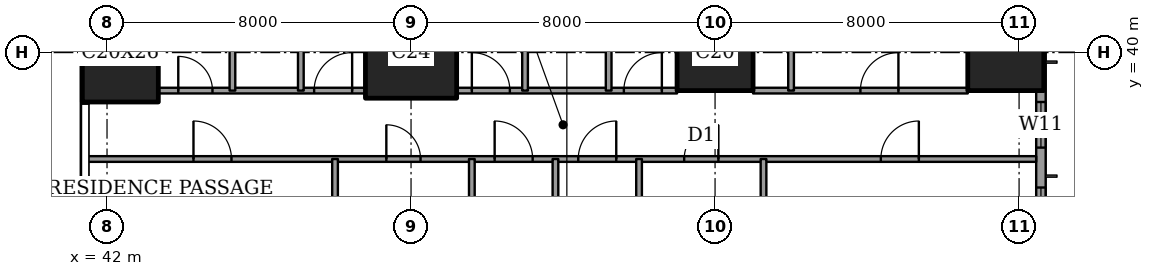
"""IFC4 building model, lengths in metres.
Left out: names, types, materials, properties, quantities, classifications, styles, units other than length and angle.
Written with IfcOpenShell. Run it as: python <this file> out.ifc"""

import sys

from ifc_helpers import new_model, si_unit, direction, frame, frame_2d, origin, origin_2d, place, context, subcontext, project, spatial, rectangle, extrude, element, fill, save


model = new_model("IFC4")
c1 = context("Model", 3, precision=1e-05, world=origin(), true_north=direction((0.0, 1.0)))
c2 = subcontext(c1, "Body", "Model", "MODEL_VIEW")
j1 = project(units=[si_unit("LENGTHUNIT", "METRE"), si_unit("PLANEANGLEUNIT", "RADIAN")], contexts=[c1])
p1 = place(None, origin())
s1 = spatial("IfcSite", under=j1, at=p1, CompositionType="ELEMENT")
p2 = place(p1, origin())
s2 = spatial("IfcBuilding", under=s1, at=p2, CompositionType="ELEMENT")
p3 = place(p2, frame((0.0, 0.0, 143.0)))
s3 = spatial("IfcBuildingStorey", under=s2, at=p3, CompositionType="ELEMENT", Elevation=143.0)
p4 = place(p3, frame((42.35, 40.0, 0.0), z_axis=(0.0, 0.0, 1.0), x_axis=(1.0, 0.0, 0.0)))
e1 = element("IfcColumn", 1, at=p4, inside=s3, PredefinedType="COLUMN", context=c2, shape_type="SweptSolid", body=[
    extrude(rectangle(XDim=2.0, YDim=2.6, at=origin_2d()), origin(), (0.0, 0.0, 1.0), 3.6),
])
p5 = place(p3, frame((50.0, 40.0, 0.0), z_axis=(0.0, 0.0, 1.0), x_axis=(1.0, 0.0, 0.0)))
e2 = element("IfcColumn", 2, at=p5, inside=s3, PredefinedType="COLUMN", context=c2, shape_type="SweptSolid", body=[
    extrude(rectangle(XDim=2.4, YDim=2.4, at=origin_2d()), origin(), (0.0, 0.0, 1.0), 3.6),
])
for number, where, z_axis, x_axis in (
    (3, (58.0, 40.0, 0.0), (0.0, 0.0, 1.0), (1.0, 0.0, 0.0)),
    (4, (65.65, 40.0, 0.0), (0.0, 0.0, 1.0), (1.0, 0.0, 0.0)),
):
    element("IfcColumn", number, at=place(p3, frame(where, z_axis=z_axis, x_axis=x_axis)), inside=s3, PredefinedType="COLUMN", context=c2, shape_type="SweptSolid", body=[
        extrude(rectangle(XDim=2.0, YDim=2.0, at=origin_2d()), origin(), (0.0, 0.0, 1.0), 3.6),
    ])
p6 = place(p3, frame((66.575, 3.175, 0.0), z_axis=(0.0, 0.0, 1.0), x_axis=(0.0, 1.0, 0.0)))
e5 = element("IfcWall", 5, at=p6, inside=s3, PredefinedType="SOLIDWALL", context=c2, shape_type="SweptSolid", body=[
    extrude(rectangle(XDim=41.65, YDim=0.25, at=frame_2d((20.825, 0.0))), origin(), (0.0, 0.0, 1.0), 3.6),
])
p7 = place(p6, frame((0.775, 0.0, 0.4)))
e6 = element("IfcOpeningElement", 6, at=p7, cuts=e5, PredefinedType="OPENING", context=c2, shape_type="SweptSolid", body=[
    extrude(rectangle(XDim=2.4, YDim=2.2, at=frame_2d((1.2, 1.1))), frame((0.0, 0.135, 0.0), z_axis=(0.0, -1.0, 0.0), x_axis=(1.0, 0.0, 0.0)), (0.0, 0.0, 1.0), 0.27),
])
p8 = place(p6, frame((6.1, 0.0, 0.4)))
e7 = element("IfcOpeningElement", 7, at=p8, cuts=e5, PredefinedType="OPENING", context=c2, shape_type="SweptSolid", body=[
    extrude(rectangle(XDim=1.2, YDim=2.2, at=frame_2d((0.6, 1.1))), frame((0.0, 0.135, 0.0), z_axis=(0.0, -1.0, 0.0), x_axis=(1.0, 0.0, 0.0)), (0.0, 0.0, 1.0), 0.27),
])
p9 = place(p6, frame((8.275, 0.0, 0.4)))
e8 = element("IfcOpeningElement", 8, at=p9, cuts=e5, PredefinedType="OPENING", context=c2, shape_type="SweptSolid", body=[
    extrude(rectangle(XDim=2.4, YDim=2.2, at=frame_2d((1.2, 1.1))), frame((0.0, 0.135, 0.0), z_axis=(0.0, -1.0, 0.0), x_axis=(1.0, 0.0, 0.0)), (0.0, 0.0, 1.0), 0.27),
])
p10 = place(p6, frame((15.775, 0.0, 0.4)))
e9 = element("IfcOpeningElement", 9, at=p10, cuts=e5, PredefinedType="OPENING", context=c2, shape_type="SweptSolid", body=[
    extrude(rectangle(XDim=2.4, YDim=2.2, at=frame_2d((1.2, 1.1))), frame((0.0, 0.135, 0.0), z_axis=(0.0, -1.0, 0.0), x_axis=(1.0, 0.0, 0.0)), (0.0, 0.0, 1.0), 0.27),
])
p11 = place(p6, frame((23.475, 0.0, 0.4)))
e10 = element("IfcOpeningElement", 10, at=p11, cuts=e5, PredefinedType="OPENING", context=c2, shape_type="SweptSolid", body=[
    extrude(rectangle(XDim=2.4, YDim=2.2, at=frame_2d((1.2, 1.1))), frame((0.0, 0.135, 0.0), z_axis=(0.0, -1.0, 0.0), x_axis=(1.0, 0.0, 0.0)), (0.0, 0.0, 1.0), 0.27),
])
p12 = place(p6, frame((30.875, 0.0, 0.4)))
e11 = element("IfcOpeningElement", 11, at=p12, cuts=e5, PredefinedType="OPENING", context=c2, shape_type="SweptSolid", body=[
    extrude(rectangle(XDim=2.4, YDim=2.2, at=frame_2d((1.2, 1.1))), frame((0.0, 0.135, 0.0), z_axis=(0.0, -1.0, 0.0), x_axis=(1.0, 0.0, 0.0)), (0.0, 0.0, 1.0), 0.27),
])
p13 = place(p6, frame((34.325, 0.0, 0.4)))
e12 = element("IfcOpeningElement", 12, at=p13, cuts=e5, PredefinedType="OPENING", context=c2, shape_type="SweptSolid", body=[
    extrude(rectangle(XDim=1.2, YDim=2.2, at=frame_2d((0.6, 1.1))), frame((0.0, 0.135, 0.0), z_axis=(0.0, -1.0, 0.0), x_axis=(1.0, 0.0, 0.0)), (0.0, 0.0, 1.0), 0.27),
])
p14 = place(p6, frame((38.475, 0.0, 0.4)))
e13 = element("IfcOpeningElement", 13, at=p14, cuts=e5, PredefinedType="OPENING", context=c2, shape_type="SweptSolid", body=[
    extrude(rectangle(XDim=2.4, YDim=2.2, at=frame_2d((1.2, 1.1))), frame((0.0, 0.135, 0.0), z_axis=(0.0, -1.0, 0.0), x_axis=(1.0, 0.0, 0.0)), (0.0, 0.0, 1.0), 0.27),
])
p15 = place(p3, frame((41.439, 37.2, 0.0), z_axis=(0.0, 0.0, 1.0), x_axis=(1.0, 0.0, 0.0)))
e14 = element("IfcWall", 14, at=p15, inside=s3, PredefinedType="PARTITIONING", context=c2, shape_type="SweptSolid", body=[
    extrude(rectangle(XDim=25.011, YDim=0.15, at=frame_2d((12.505, 0.0))), origin(), (0.0, 0.0, 1.0), 3.35),
])
p16 = place(p15, frame((10.761, 0.0, 0.0)))
e15 = element("IfcOpeningElement", 15, at=p16, cuts=e14, PredefinedType="OPENING", context=c2, shape_type="SweptSolid", body=[
    extrude(rectangle(XDim=1.0, YDim=2.1, at=frame_2d((0.5, 1.05))), frame((0.0, 0.085, 0.0), z_axis=(0.0, -1.0, 0.0), x_axis=(1.0, 0.0, 0.0)), (0.0, 0.0, 1.0), 0.17),
])
p17 = place(p15, frame((20.924, 0.0, 0.0)))
e16 = element("IfcOpeningElement", 16, at=p17, cuts=e14, PredefinedType="OPENING", context=c2, shape_type="SweptSolid", body=[
    extrude(rectangle(XDim=1.0, YDim=2.1, at=frame_2d((0.5, 1.05))), frame((0.0, 0.085, 0.0), z_axis=(0.0, -1.0, 0.0), x_axis=(1.0, 0.0, 0.0)), (0.0, 0.0, 1.0), 0.17),
])
p18 = place(p15, frame((15.749, 0.0, 0.0)))
e17 = element("IfcOpeningElement", 17, at=p18, cuts=e14, PredefinedType="OPENING", context=c2, shape_type="SweptSolid", body=[
    extrude(rectangle(XDim=0.9, YDim=2.1, at=frame_2d((0.45, 1.05))), frame((0.0, 0.085, 0.0), z_axis=(0.0, -1.0, 0.0), x_axis=(1.0, 0.0, 0.0)), (0.0, 0.0, 1.0), 0.17),
])
p19 = place(p15, frame((12.961, 0.0, 0.0)))
e18 = element("IfcOpeningElement", 18, at=p19, cuts=e14, PredefinedType="OPENING", context=c2, shape_type="SweptSolid", body=[
    extrude(rectangle(XDim=1.0, YDim=2.1, at=frame_2d((0.5, 1.05))), frame((0.0, 0.085, 0.0), z_axis=(0.0, -1.0, 0.0), x_axis=(1.0, 0.0, 0.0)), (0.0, 0.0, 1.0), 0.17),
])
p20 = place(p15, frame((7.911, 0.0, 0.0)))
e19 = element("IfcOpeningElement", 19, at=p20, cuts=e14, PredefinedType="OPENING", context=c2, shape_type="SweptSolid", body=[
    extrude(rectangle(XDim=0.9, YDim=2.1, at=frame_2d((0.45, 1.05))), frame((0.0, 0.085, 0.0), z_axis=(0.0, -1.0, 0.0), x_axis=(1.0, 0.0, 0.0)), (0.0, 0.0, 1.0), 0.17),
])
p21 = place(p15, frame((2.836, 0.0, 0.0)))
e20 = element("IfcOpeningElement", 20, at=p21, cuts=e14, PredefinedType="OPENING", context=c2, shape_type="SweptSolid", body=[
    extrude(rectangle(XDim=1.0, YDim=2.1, at=frame_2d((0.5, 1.05))), frame((0.0, 0.085, 0.0), z_axis=(0.0, -1.0, 0.0), x_axis=(1.0, 0.0, 0.0)), (0.0, 0.0, 1.0), 0.17),
])
p22 = place(p3, frame((43.35, 39.0, 0.0), z_axis=(0.0, 0.0, 1.0), x_axis=(1.0, 0.0, 0.0)))
e21 = element("IfcWall", 21, at=p22, inside=s3, PredefinedType="PARTITIONING", context=c2, shape_type="SweptSolid", body=[
    extrude(rectangle(XDim=5.45, YDim=0.15, at=frame_2d((2.725, 0.0))), origin(), (0.0, 0.0, 1.0), 3.35),
])
p23 = place(p22, frame((4.1, 0.0, 0.0)))
e22 = element("IfcOpeningElement", 22, at=p23, cuts=e21, PredefinedType="OPENING", context=c2, shape_type="SweptSolid", body=[
    extrude(rectangle(XDim=1.0, YDim=2.1, at=frame_2d((0.5, 1.05))), frame((0.0, 0.085, 0.0), z_axis=(0.0, -1.0, 0.0), x_axis=(1.0, 0.0, 0.0)), (0.0, 0.0, 1.0), 0.17),
])
p24 = place(p22, frame((0.525, 0.0, 0.0)))
e23 = element("IfcOpeningElement", 23, at=p24, cuts=e21, PredefinedType="OPENING", context=c2, shape_type="SweptSolid", body=[
    extrude(rectangle(XDim=0.9, YDim=2.1, at=frame_2d((0.45, 1.05))), frame((0.0, 0.085, 0.0), z_axis=(0.0, -1.0, 0.0), x_axis=(1.0, 0.0, 0.0)), (0.0, 0.0, 1.0), 0.17),
])
p25 = place(p3, frame((51.2, 39.0, 0.0), z_axis=(0.0, 0.0, 1.0), x_axis=(1.0, 0.0, 0.0)))
e24 = element("IfcWall", 24, at=p25, inside=s3, PredefinedType="PARTITIONING", context=c2, shape_type="SweptSolid", body=[
    extrude(rectangle(XDim=5.8, YDim=0.15, at=frame_2d((2.9, 0.0))), origin(), (0.0, 0.0, 1.0), 3.35),
])
p26 = place(p25, frame((4.4, 0.0, 0.0)))
e25 = element("IfcOpeningElement", 25, at=p26, cuts=e24, PredefinedType="OPENING", context=c2, shape_type="SweptSolid", body=[
    extrude(rectangle(XDim=1.0, YDim=2.1, at=frame_2d((0.5, 1.05))), frame((0.0, 0.085, 0.0), z_axis=(0.0, -1.0, 0.0), x_axis=(1.0, 0.0, 0.0)), (0.0, 0.0, 1.0), 0.17),
])
p27 = place(p25, frame((0.4, 0.0, 0.0)))
e26 = element("IfcOpeningElement", 26, at=p27, cuts=e24, PredefinedType="OPENING", context=c2, shape_type="SweptSolid", body=[
    extrude(rectangle(XDim=1.0, YDim=2.1, at=frame_2d((0.5, 1.05))), frame((0.0, 0.085, 0.0), z_axis=(0.0, -1.0, 0.0), x_axis=(1.0, 0.0, 0.0)), (0.0, 0.0, 1.0), 0.17),
])
p28 = place(p3, frame((59.0, 39.0, 0.0), z_axis=(0.0, 0.0, 1.0), x_axis=(1.0, 0.0, 0.0)))
e27 = element("IfcWall", 27, at=p28, inside=s3, PredefinedType="PARTITIONING", context=c2, shape_type="SweptSolid", body=[
    extrude(rectangle(XDim=5.65, YDim=0.15, at=frame_2d((2.825, 0.0))), origin(), (0.0, 0.0, 1.0), 3.35),
])
p29 = place(p28, frame((2.825, 0.0, 0.0)))
e28 = element("IfcOpeningElement", 28, at=p29, cuts=e27, PredefinedType="OPENING", context=c2, shape_type="SweptSolid", body=[
    extrude(rectangle(XDim=1.0, YDim=2.1, at=frame_2d((0.5, 1.05))), frame((0.0, 0.085, 0.0), z_axis=(0.0, -1.0, 0.0), x_axis=(1.0, 0.0, 0.0)), (0.0, 0.0, 1.0), 0.17),
])
p30 = place(p3, frame((45.3, 39.0, 0.0), z_axis=(0.0, 0.0, 1.0), x_axis=(0.0, 1.0, 0.0)))
e29 = element("IfcWall", 29, at=p30, inside=s3, PredefinedType="PARTITIONING", context=c2, shape_type="SweptSolid", body=[
    extrude(rectangle(XDim=9.45, YDim=0.15, at=frame_2d((4.725, 0.0))), origin(), (0.0, 0.0, 1.0), 3.35),
])
p31 = place(p3, frame((47.1, 39.0, 0.0), z_axis=(0.0, 0.0, 1.0), x_axis=(0.0, 1.0, 0.0)))
e30 = element("IfcWall", 30, at=p31, inside=s3, PredefinedType="PARTITIONING", context=c2, shape_type="SweptSolid", body=[
    extrude(rectangle(XDim=4.7, YDim=0.15, at=frame_2d((2.35, 0.0))), origin(), (0.0, 0.0, 1.0), 3.35),
])
p32 = place(p31, frame((1.9, 0.0, 0.0)))
e31 = element("IfcOpeningElement", 31, at=p32, cuts=e30, PredefinedType="OPENING", context=c2, shape_type="SweptSolid", body=[
    extrude(rectangle(XDim=0.9, YDim=2.1, at=frame_2d((0.45, 1.05))), frame((0.0, 0.085, 0.0), z_axis=(0.0, -1.0, 0.0), x_axis=(1.0, 0.0, 0.0)), (0.0, 0.0, 1.0), 0.17),
])
p33 = place(p3, frame((48.0, 28.0, 0.0), z_axis=(0.0, 0.0, 1.0), x_axis=(0.0, 1.0, 0.0)))
e32 = element("IfcWall", 32, at=p33, inside=s3, PredefinedType="PARTITIONING", context=c2, shape_type="SweptSolid", body=[
    extrude(rectangle(XDim=9.2, YDim=0.15, at=frame_2d((4.6, 0.0))), origin(), (0.0, 0.0, 1.0), 3.35),
])
p34 = place(p33, frame((0.5, 0.0, 0.0)))
e33 = element("IfcOpeningElement", 33, at=p34, cuts=e32, PredefinedType="OPENING", context=c2, shape_type="SweptSolid", body=[
    extrude(rectangle(XDim=1.0, YDim=2.1, at=frame_2d((0.5, 1.05))), frame((0.0, 0.085, 0.0), z_axis=(0.0, -1.0, 0.0), x_axis=(1.0, 0.0, 0.0)), (0.0, 0.0, 1.0), 0.17),
])
p35 = place(p3, frame((51.6, 30.0, 0.0), z_axis=(0.0, 0.0, 1.0), x_axis=(0.0, 1.0, 0.0)))
e34 = element("IfcWall", 34, at=p35, inside=s3, PredefinedType="PARTITIONING", context=c2, shape_type="SweptSolid", body=[
    extrude(rectangle(XDim=7.2, YDim=0.15, at=frame_2d((3.6, 0.0))), origin(), (0.0, 0.0, 1.0), 3.35),
])
p36 = place(p3, frame((53.0, 39.0, 0.0), z_axis=(0.0, 0.0, 1.0), x_axis=(0.0, 1.0, 0.0)))
e35 = element("IfcWall", 35, at=p36, inside=s3, PredefinedType="PARTITIONING", context=c2, shape_type="SweptSolid", body=[
    extrude(rectangle(XDim=9.45, YDim=0.15, at=frame_2d((4.725, 0.0))), origin(), (0.0, 0.0, 1.0), 3.35),
])
p37 = place(p3, frame((53.8, 30.0, 0.0), z_axis=(0.0, 0.0, 1.0), x_axis=(0.0, 1.0, 0.0)))
e36 = element("IfcWall", 36, at=p37, inside=s3, PredefinedType="PARTITIONING", context=c2, shape_type="SweptSolid", body=[
    extrude(rectangle(XDim=7.2, YDim=0.15, at=frame_2d((3.6, 0.0))), origin(), (0.0, 0.0, 1.0), 3.35),
])
p38 = place(p3, frame((55.2, 39.0, 0.0), z_axis=(0.0, 0.0, 1.0), x_axis=(0.0, 1.0, 0.0)))
e37 = element("IfcWall", 37, at=p38, inside=s3, PredefinedType="PARTITIONING", context=c2, shape_type="SweptSolid", body=[
    extrude(rectangle(XDim=3.4, YDim=0.15, at=frame_2d((1.7, 0.0))), origin(), (0.0, 0.0, 1.0), 3.35),
])
p39 = place(p38, frame((1.25, 0.0, 0.0)))
e38 = element("IfcOpeningElement", 38, at=p39, cuts=e37, PredefinedType="OPENING", context=c2, shape_type="SweptSolid", body=[
    extrude(rectangle(XDim=0.9, YDim=2.1, at=frame_2d((0.45, 1.05))), frame((0.0, 0.085, 0.0), z_axis=(0.0, -1.0, 0.0), x_axis=(1.0, 0.0, 0.0)), (0.0, 0.0, 1.0), 0.17),
])
p40 = place(p3, frame((56.0, 28.0, 0.0), z_axis=(0.0, 0.0, 1.0), x_axis=(0.0, 1.0, 0.0)))
e39 = element("IfcWall", 39, at=p40, inside=s3, PredefinedType="PARTITIONING", context=c2, shape_type="SweptSolid", body=[
    extrude(rectangle(XDim=9.2, YDim=0.15, at=frame_2d((4.6, 0.0))), origin(), (0.0, 0.0, 1.0), 3.35),
])
p41 = place(p40, frame((0.5, 0.0, 0.0)))
e40 = element("IfcOpeningElement", 40, at=p41, cuts=e39, PredefinedType="OPENING", context=c2, shape_type="SweptSolid", body=[
    extrude(rectangle(XDim=1.0, YDim=2.1, at=frame_2d((0.5, 1.05))), frame((0.0, 0.085, 0.0), z_axis=(0.0, -1.0, 0.0), x_axis=(1.0, 0.0, 0.0)), (0.0, 0.0, 1.0), 0.17),
])
p42 = place(p3, frame((59.275, 33.2, 0.0), z_axis=(0.0, 0.0, 1.0), x_axis=(0.0, 1.0, 0.0)))
e41 = element("IfcWall", 41, at=p42, inside=s3, PredefinedType="PARTITIONING", context=c2, shape_type="SweptSolid", body=[
    extrude(rectangle(XDim=4.0, YDim=0.15, at=frame_2d((2.0, 0.0))), origin(), (0.0, 0.0, 1.0), 3.35),
])
p43 = place(p3, frame((60.0, 39.0, 0.0), z_axis=(0.0, 0.0, 1.0), x_axis=(0.0, 1.0, 0.0)))
e42 = element("IfcWall", 42, at=p43, inside=s3, PredefinedType="PARTITIONING", context=c2, shape_type="SweptSolid", body=[
    extrude(rectangle(XDim=9.45, YDim=0.15, at=frame_2d((4.725, 0.0))), origin(), (0.0, 0.0, 1.0), 3.35),
])
p44 = place(p12, origin())
e43 = element("IfcWindow", 43, at=p44, inside=s3, PartitioningType="SINGLE_PANEL", PredefinedType="WINDOW", context=c2, shape_type="SweptSolid", body=[
    extrude(rectangle(XDim=2.4, YDim=2.2, at=frame_2d((1.2, 1.1))), frame((0.0, 0.03, 0.0), z_axis=(0.0, -1.0, 0.0), x_axis=(1.0, 0.0, 0.0)), (0.0, 0.0, 1.0), 0.06),
])
fill(e11, e43)
p45 = place(p13, origin())
e44 = element("IfcWindow", 44, at=p45, inside=s3, PartitioningType="SINGLE_PANEL", PredefinedType="WINDOW", context=c2, shape_type="SweptSolid", body=[
    extrude(rectangle(XDim=1.2, YDim=2.2, at=frame_2d((0.6, 1.1))), frame((0.0, 0.03, 0.0), z_axis=(0.0, -1.0, 0.0), x_axis=(1.0, 0.0, 0.0)), (0.0, 0.0, 1.0), 0.06),
])
fill(e12, e44)
p46 = place(p29, origin())
e45 = element("IfcDoor", 45, at=p46, inside=s3, OperationType="SINGLE_SWING_LEFT", PredefinedType="DOOR", context=c2, shape_type="SweptSolid", body=[
    extrude(rectangle(XDim=1.0, YDim=2.1, at=frame_2d((0.5, 1.05))), frame((0.0, 0.025, 0.0), z_axis=(0.0, -1.0, 0.0), x_axis=(1.0, 0.0, 0.0)), (0.0, 0.0, 1.0), 0.05),
])
fill(e28, e45)
p47 = place(p26, origin())
e46 = element("IfcDoor", 46, at=p47, inside=s3, OperationType="SINGLE_SWING_LEFT", PredefinedType="DOOR", context=c2, shape_type="SweptSolid", body=[
    extrude(rectangle(XDim=1.0, YDim=2.1, at=frame_2d((0.5, 1.05))), frame((0.0, 0.025, 0.0), z_axis=(0.0, -1.0, 0.0), x_axis=(1.0, 0.0, 0.0)), (0.0, 0.0, 1.0), 0.05),
])
fill(e25, e46)
p48 = place(p27, origin())
e47 = element("IfcDoor", 47, at=p48, inside=s3, OperationType="SINGLE_SWING_RIGHT", PredefinedType="DOOR", context=c2, shape_type="SweptSolid", body=[
    extrude(rectangle(XDim=1.0, YDim=2.1, at=frame_2d((0.5, 1.05))), frame((0.0, 0.025, 0.0), z_axis=(0.0, -1.0, 0.0), x_axis=(1.0, 0.0, 0.0)), (0.0, 0.0, 1.0), 0.05),
])
fill(e26, e47)
p49 = place(p23, origin())
e48 = element("IfcDoor", 48, at=p49, inside=s3, OperationType="SINGLE_SWING_LEFT", PredefinedType="DOOR", context=c2, shape_type="SweptSolid", body=[
    extrude(rectangle(XDim=1.0, YDim=2.1, at=frame_2d((0.5, 1.05))), frame((0.0, 0.025, 0.0), z_axis=(0.0, -1.0, 0.0), x_axis=(1.0, 0.0, 0.0)), (0.0, 0.0, 1.0), 0.05),
])
fill(e22, e48)
p50 = place(p24, origin())
e49 = element("IfcDoor", 49, at=p50, inside=s3, OperationType="SINGLE_SWING_RIGHT", PredefinedType="DOOR", context=c2, shape_type="SweptSolid", body=[
    extrude(rectangle(XDim=0.9, YDim=2.1, at=frame_2d((0.45, 1.05))), frame((0.0, 0.025, 0.0), z_axis=(0.0, -1.0, 0.0), x_axis=(1.0, 0.0, 0.0)), (0.0, 0.0, 1.0), 0.05),
])
fill(e23, e49)
p51 = place(p16, origin())
e50 = element("IfcDoor", 50, at=p51, inside=s3, OperationType="SINGLE_SWING_RIGHT", PredefinedType="DOOR", context=c2, shape_type="SweptSolid", body=[
    extrude(rectangle(XDim=1.0, YDim=2.1, at=frame_2d((0.5, 1.05))), frame((0.0, 0.025, 0.0), z_axis=(0.0, -1.0, 0.0), x_axis=(1.0, 0.0, 0.0)), (0.0, 0.0, 1.0), 0.05),
])
fill(e15, e50)
p52 = place(p17, origin())
e51 = element("IfcDoor", 51, at=p52, inside=s3, OperationType="SINGLE_SWING_LEFT", PredefinedType="DOOR", context=c2, shape_type="SweptSolid", body=[
    extrude(rectangle(XDim=1.0, YDim=2.1, at=frame_2d((0.5, 1.05))), frame((0.0, 0.025, 0.0), z_axis=(0.0, -1.0, 0.0), x_axis=(1.0, 0.0, 0.0)), (0.0, 0.0, 1.0), 0.05),
])
fill(e16, e51)
p53 = place(p18, origin())
e52 = element("IfcDoor", 52, at=p53, inside=s3, OperationType="SINGLE_SWING_LEFT", PredefinedType="DOOR", context=c2, shape_type="SweptSolid", body=[
    extrude(rectangle(XDim=0.9, YDim=2.1, at=frame_2d((0.45, 1.05))), frame((0.0, 0.025, 0.0), z_axis=(0.0, -1.0, 0.0), x_axis=(1.0, 0.0, 0.0)), (0.0, 0.0, 1.0), 0.05),
])
fill(e17, e52)
p54 = place(p19, origin())
e53 = element("IfcDoor", 53, at=p54, inside=s3, OperationType="SINGLE_SWING_LEFT", PredefinedType="DOOR", context=c2, shape_type="SweptSolid", body=[
    extrude(rectangle(XDim=1.0, YDim=2.1, at=frame_2d((0.5, 1.05))), frame((0.0, 0.025, 0.0), z_axis=(0.0, -1.0, 0.0), x_axis=(1.0, 0.0, 0.0)), (0.0, 0.0, 1.0), 0.05),
])
fill(e18, e53)
p55 = place(p20, origin())
e54 = element("IfcDoor", 54, at=p55, inside=s3, OperationType="SINGLE_SWING_RIGHT", PredefinedType="DOOR", context=c2, shape_type="SweptSolid", body=[
    extrude(rectangle(XDim=0.9, YDim=2.1, at=frame_2d((0.45, 1.05))), frame((0.0, 0.025, 0.0), z_axis=(0.0, -1.0, 0.0), x_axis=(1.0, 0.0, 0.0)), (0.0, 0.0, 1.0), 0.05),
])
fill(e19, e54)
p56 = place(p21, origin())
e55 = element("IfcDoor", 55, at=p56, inside=s3, OperationType="SINGLE_SWING_RIGHT", PredefinedType="DOOR", context=c2, shape_type="SweptSolid", body=[
    extrude(rectangle(XDim=1.0, YDim=2.1, at=frame_2d((0.5, 1.05))), frame((0.0, 0.025, 0.0), z_axis=(0.0, -1.0, 0.0), x_axis=(1.0, 0.0, 0.0)), (0.0, 0.0, 1.0), 0.05),
])
fill(e20, e55)
save(model, sys.argv[1])
